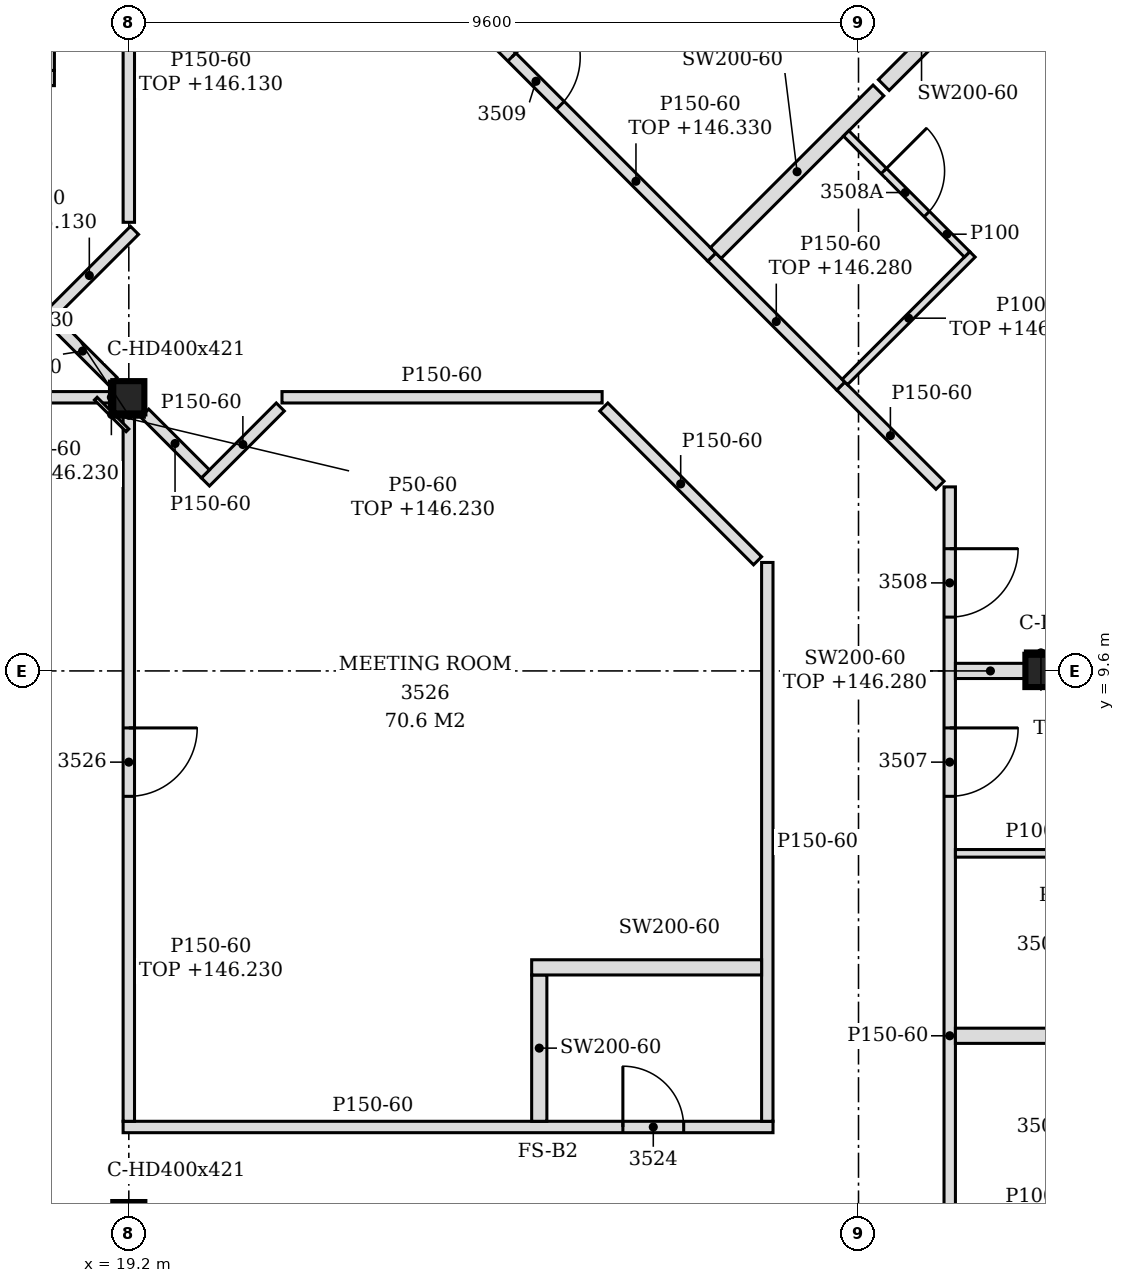
"""IFC4 building model, lengths in metres.
Left out: names, types, materials, properties, quantities, classifications, styles, units other than length and angle.
Written with IfcOpenShell. Run it as: python <this file> out.ifc"""

import sys

from ifc_helpers import new_model, si_unit, direction, frame, frame_2d, origin, origin_2d, place, context, subcontext, project, spatial, polyline, rectangle, i_section, outline, extrude, element, fill, save


model = new_model("IFC4")
c1 = context("Model", 3, precision=1e-05, world=origin(), true_north=direction((0.0, 1.0)))
c2 = subcontext(c1, "Body", "Model", "MODEL_VIEW")
j1 = project(units=[si_unit("LENGTHUNIT", "METRE"), si_unit("PLANEANGLEUNIT", "RADIAN")], contexts=[c1])
p1 = place(None, origin())
s1 = spatial("IfcSite", under=j1, at=p1, CompositionType="ELEMENT")
p2 = place(p1, origin())
s2 = spatial("IfcBuilding", under=s1, at=p2, CompositionType="ELEMENT")
p3 = place(p2, frame((0.0, 0.0, 143.4)))
s3 = spatial("IfcBuildingStorey", under=s2, at=p3, CompositionType="ELEMENT", Elevation=143.4)
for number, where, z_axis, x_axis in (
    (1, (19.2, 2.4, -0.15), (0.0, 0.0, 1.0), (1.0, 0.0, 0.0)),
    (2, (19.2, 13.2, -0.15), (0.0, 0.0, 1.0), (1.0, 0.0, 0.0)),
    (3, (31.2, 9.6, -0.15), (0.0, 0.0, 1.0), (1.0, 0.0, 0.0)),
):
    element("IfcColumn", number, at=place(p3, frame(where, z_axis=z_axis, x_axis=x_axis)), inside=s3, PredefinedType="COLUMN", context=c2, shape_type="SweptSolid", body=[
        extrude(i_section(OverallWidth=0.409, OverallDepth=0.425, WebThickness=0.033, FlangeThickness=0.052, FilletRadius=0.015, at=origin_2d()), origin(), (0.0, 0.0, 1.0), 3.6),
    ])
p4 = place(p3, frame((30.0, -0.813, 0.0), z_axis=(0.0, 0.0, 1.0), x_axis=(0.0, 1.0, 0.0)))
e4 = element("IfcWall", 4, at=p4, inside=s3, PredefinedType="PARTITIONING", context=c2, shape_type="SweptSolid", body=[
    extrude(outline(polyline([(0.0, 0.0), (12.834, 0.0), (12.834, 3.45), (10.518, 3.45), (10.516, 2.88), (10.308, 2.88), (10.306, 3.45), (5.718, 3.45), (5.716, 2.88), (5.508, 2.88), (5.506, 3.45), (0.918, 3.45), (0.916, 2.88), (0.708, 2.88), (0.706, 3.45), (0.0, 3.45), (0.0, 0.0)])), frame((0.0, 0.075, 0.0), z_axis=(0.0, -1.0, 0.0), x_axis=(1.0, 0.0, 0.0)), (0.0, 0.0, 1.0), 0.15),
])
p5 = place(p4, frame((1.563, 0.0, 0.0)))
e5 = element("IfcOpeningElement", 5, at=p5, cuts=e4, PredefinedType="OPENING", context=c2, shape_type="SweptSolid", body=[
    extrude(rectangle(XDim=0.9, YDim=2.1, at=frame_2d((0.45, 1.05))), frame((0.0, 0.085, 0.0), z_axis=(0.0, -1.0, 0.0), x_axis=(1.0, 0.0, 0.0)), (0.0, 0.0, 1.0), 0.17),
])
p6 = place(p4, frame((8.763, 0.0, 0.0)))
e6 = element("IfcOpeningElement", 6, at=p6, cuts=e4, PredefinedType="OPENING", context=c2, shape_type="SweptSolid", body=[
    extrude(rectangle(XDim=0.9, YDim=2.1, at=frame_2d((0.45, 1.05))), frame((0.0, 0.085, 0.0), z_axis=(0.0, -1.0, 0.0), x_axis=(1.0, 0.0, 0.0)), (0.0, 0.0, 1.0), 0.17),
])
p7 = place(p4, frame((11.121, 0.0, 0.0)))
e7 = element("IfcOpeningElement", 7, at=p7, cuts=e4, PredefinedType="OPENING", context=c2, shape_type="SweptSolid", body=[
    extrude(rectangle(XDim=0.9, YDim=2.1, at=frame_2d((0.45, 1.05))), frame((0.0, 0.085, 0.0), z_axis=(0.0, -1.0, 0.0), x_axis=(1.0, 0.0, 0.0)), (0.0, 0.0, 1.0), 0.17),
])
p8 = place(p3, frame((19.125, 3.6, 0.0), z_axis=(0.0, 0.0, 1.0), x_axis=(1.0, 0.0, 0.0)))
e8 = element("IfcWall", 8, at=p8, inside=s3, PredefinedType="PARTITIONING", context=c2, shape_type="SweptSolid", body=[
    extrude(outline(polyline([(0.0, 0.0), (8.55, 0.0), (8.55, 3.45), (0.225, 3.45), (0.223, 2.83), (0.0, 2.83), (0.0, 0.0)])), frame((0.0, 0.075, 0.0), z_axis=(0.0, -1.0, 0.0), x_axis=(1.0, 0.0, 0.0)), (0.0, 0.0, 1.0), 0.15),
])
p9 = place(p8, frame((6.575, 0.0, 0.0)))
e9 = element("IfcOpeningElement", 9, at=p9, cuts=e8, PredefinedType="OPENING", context=c2, shape_type="SweptSolid", body=[
    extrude(rectangle(XDim=0.8, YDim=2.1, at=frame_2d((0.4, 1.05))), frame((0.0, 0.085, 0.0), z_axis=(0.0, -1.0, 0.0), x_axis=(1.0, 0.0, 0.0)), (0.0, 0.0, 1.0), 0.17),
])
p10 = place(p3, frame((19.2, 3.675, 0.0), z_axis=(0.0, 0.0, 1.0), x_axis=(0.0, 1.0, 0.0)))
e10 = element("IfcWall", 10, at=p10, inside=s3, PredefinedType="PARTITIONING", context=c2, shape_type="SweptSolid", body=[
    extrude(rectangle(XDim=9.312, YDim=0.15, at=frame_2d((4.656, 0.0))), origin(), (0.0, 0.0, 1.0), 2.83),
])
p11 = place(p10, frame((4.275, 0.0, 0.0)))
e11 = element("IfcOpeningElement", 11, at=p11, cuts=e10, PredefinedType="OPENING", context=c2, shape_type="SweptSolid", body=[
    extrude(rectangle(XDim=0.9, YDim=2.1, at=frame_2d((0.45, 1.05))), frame((0.0, 0.085, 0.0), z_axis=(0.0, -1.0, 0.0), x_axis=(1.0, 0.0, 0.0)), (0.0, 0.0, 1.0), 0.17),
])
p12 = place(p3, frame((24.6, 3.675, 0.0), z_axis=(0.0, 0.0, 1.0), x_axis=(0.0, 1.0, 0.0)))
e12 = element("IfcWall", 12, at=p12, inside=s3, PredefinedType="PARTITIONING", context=c2, shape_type="SweptSolid", body=[
    extrude(outline(polyline([(0.0, 0.0), (1.925, 0.0), (1.925, 3.45), (1.23, 3.45), (1.228, 2.88), (1.02, 2.88), (1.018, 3.45), (0.0, 3.45), (0.0, 0.0)])), frame((0.0, 0.1, 0.0), z_axis=(0.0, -1.0, 0.0), x_axis=(1.0, 0.0, 0.0)), (0.0, 0.0, 1.0), 0.2),
])
p13 = place(p3, frame((27.6, 3.675, 0.0), z_axis=(0.0, 0.0, 1.0), x_axis=(0.0, 1.0, 0.0)))
e13 = element("IfcWall", 13, at=p13, inside=s3, PredefinedType="PARTITIONING", context=c2, shape_type="SweptSolid", body=[
    extrude(outline(polyline([(0.0, 0.0), (7.352, 0.0), (7.352, 3.45), (6.03, 3.45), (6.028, 2.88), (5.82, 2.88), (5.818, 3.45), (1.23, 3.45), (1.228, 2.88), (1.02, 2.88), (1.018, 3.45), (0.0, 3.45), (0.0, 0.0)])), frame((0.0, 0.075, 0.0), z_axis=(0.0, -1.0, 0.0), x_axis=(1.0, 0.0, 0.0)), (0.0, 0.0, 1.0), 0.15),
])
p14 = place(p3, frame((30.075, 4.8, 0.0), z_axis=(0.0, 0.0, 1.0), x_axis=(1.0, 0.0, 0.0)))
e14 = element("IfcWall", 14, at=p14, inside=s3, PredefinedType="PARTITIONING", context=c2, shape_type="SweptSolid", body=[
    extrude(rectangle(XDim=4.675, YDim=0.2, at=frame_2d((2.337, 0.0))), origin(), (0.0, 0.0, 1.0), 2.88),
])
p15 = place(p3, frame((24.5, 5.7, 0.0), z_axis=(0.0, 0.0, 1.0), x_axis=(1.0, 0.0, 0.0)))
e15 = element("IfcWall", 15, at=p15, inside=s3, PredefinedType="PARTITIONING", context=c2, shape_type="SweptSolid", body=[
    extrude(rectangle(XDim=3.025, YDim=0.2, at=frame_2d((1.512, 0.0))), origin(), (0.0, 0.0, 1.0), 3.45),
])
p16 = place(p3, frame((30.075, 7.2, 0.0), z_axis=(0.0, 0.0, 1.0), x_axis=(1.0, 0.0, 0.0)))
e16 = element("IfcWall", 16, at=p16, inside=s3, PredefinedType="PARTITIONING", context=c2, shape_type="SweptSolid", body=[
    extrude(outline(polyline([(0.0, 0.0), (1.975, 0.0), (1.975, 3.45), (1.275, 3.45), (1.273, 2.93), (0.975, 2.93), (0.973, 3.45), (0.0, 3.45), (0.0, 0.0)])), frame((0.0, 0.05, 0.0), z_axis=(0.0, -1.0, 0.0), x_axis=(1.0, 0.0, 0.0)), (0.0, 0.0, 1.0), 0.1),
])
p17 = place(p3, frame((30.075, 9.6, 0.0), z_axis=(0.0, 0.0, 1.0), x_axis=(1.0, 0.0, 0.0)))
e17 = element("IfcWall", 17, at=p17, inside=s3, PredefinedType="PARTITIONING", context=c2, shape_type="SweptSolid", body=[
    extrude(rectangle(XDim=0.921, YDim=0.2, at=frame_2d((0.46, 0.0))), origin(), (0.0, 0.0, 1.0), 2.88),
])
p18 = place(p3, frame((27.472, 11.049, 0.0), z_axis=(0.0, 0.0, 1.0), x_axis=(-0.707106781187, 0.707106781187, 0.0)))
e18 = element("IfcWall", 18, at=p18, inside=s3, PredefinedType="PARTITIONING", context=c2, shape_type="SweptSolid", body=[
    extrude(rectangle(XDim=2.861, YDim=0.15, at=frame_2d((1.43, 0.0))), origin(), (0.0, 0.0, 1.0), 3.45),
])
p19 = place(p3, frame((29.872, 12.043, 0.0), z_axis=(0.0, 0.0, 1.0), x_axis=(-0.707172918471, 0.707040637716, 0.0)))
e19 = element("IfcWall", 19, at=p19, inside=s3, PredefinedType="PARTITIONING", context=c2, shape_type="SweptSolid", body=[
    extrude(rectangle(XDim=1.846, YDim=0.15, at=frame_2d((0.923, 0.0))), origin(), (0.0, 0.0, 1.0), 3.45),
])
p20 = place(p3, frame((20.208, 12.086, 0.0), z_axis=(0.0, 0.0, 1.0), x_axis=(0.706756381459, 0.707457007363, 0.0)))
e20 = element("IfcWall", 20, at=p20, inside=s3, PredefinedType="PARTITIONING", context=c2, shape_type="SweptSolid", body=[
    extrude(rectangle(XDim=1.394, YDim=0.15, at=frame_2d((0.697, 0.0))), origin(), (0.0, 0.0, 1.0), 3.45),
])
p21 = place(p3, frame((20.208, 12.192, 0.0), z_axis=(0.0, 0.0, 1.0), x_axis=(-0.70721474466, 0.706998801226, 0.0)))
e21 = element("IfcWall", 21, at=p21, inside=s3, PredefinedType="PARTITIONING", context=c2, shape_type="SweptSolid", body=[
    extrude(rectangle(XDim=1.131, YDim=0.15, at=frame_2d((0.565, 0.0))), origin(), (0.0, 0.0, 1.0), 3.45),
])
p22 = place(p3, frame((7.405, 13.2, 0.0), z_axis=(0.0, 0.0, 1.0), x_axis=(1.0, 0.0, 0.0)))
e22 = element("IfcWall", 22, at=p22, inside=s3, PredefinedType="PARTITIONING", context=c2, shape_type="SweptSolid", body=[
    extrude(rectangle(XDim=11.591, YDim=0.15, at=frame_2d((5.795, 0.0))), origin(), (0.0, 0.0, 1.0), 2.83),
])
p23 = place(p22, frame((5.345, 0.0, 0.0)))
e23 = element("IfcOpeningElement", 23, at=p23, cuts=e22, PredefinedType="OPENING", context=c2, shape_type="SweptSolid", body=[
    extrude(rectangle(XDim=0.9, YDim=2.1, at=frame_2d((0.45, 1.05))), frame((0.0, 0.085, 0.0), z_axis=(0.0, -1.0, 0.0), x_axis=(1.0, 0.0, 0.0)), (0.0, 0.0, 1.0), 0.17),
])
p24 = place(p3, frame((21.215, 13.2, 0.0), z_axis=(0.0, 0.0, 1.0), x_axis=(1.0, 0.0, 0.0)))
e24 = element("IfcWall", 24, at=p24, inside=s3, PredefinedType="PARTITIONING", context=c2, shape_type="SweptSolid", body=[
    extrude(rectangle(XDim=4.212, YDim=0.15, at=frame_2d((2.106, 0.0))), origin(), (0.0, 0.0, 1.0), 3.45),
])
p25 = place(p3, frame((28.567, 13.348, 0.0), z_axis=(0.0, 0.0, 1.0), x_axis=(-0.707310148094, 0.706903355773, 0.0)))
e25 = element("IfcWall", 25, at=p25, inside=s3, PredefinedType="PARTITIONING", context=c2, shape_type="SweptSolid", body=[
    extrude(rectangle(XDim=2.401, YDim=0.15, at=frame_2d((1.2, 0.0))), origin(), (0.0, 0.0, 1.0), 2.88),
])
p26 = place(p3, frame((18.991, 13.408, 0.0), z_axis=(0.0, 0.0, 1.0), x_axis=(-0.706998801226, 0.70721474466, 0.0)))
e26 = element("IfcWall", 26, at=p26, inside=s3, PredefinedType="PARTITIONING", context=c2, shape_type="SweptSolid", body=[
    extrude(rectangle(XDim=1.131, YDim=0.15, at=frame_2d((0.565, 0.0))), origin(), (0.0, 0.0, 1.0), 3.45),
])
p27 = place(p3, frame((28.62, 13.401, 0.0), z_axis=(0.0, 0.0, 1.0), x_axis=(0.707055379538, 0.707158179099, 0.0)))
e27 = element("IfcWall", 27, at=p27, inside=s3, PredefinedType="PARTITIONING", context=c2, shape_type="SweptSolid", body=[
    extrude(rectangle(XDim=2.375, YDim=0.1, at=frame_2d((1.188, 0.0))), origin(), (0.0, 0.0, 1.0), 2.88),
])
p28 = place(p3, frame((18.086, 14.208, 0.0), z_axis=(0.0, 0.0, 1.0), x_axis=(0.70739723372, 0.706816209298, 0.0)))
e28 = element("IfcWall", 28, at=p28, inside=s3, PredefinedType="PARTITIONING", context=c2, shape_type="SweptSolid", body=[
    extrude(rectangle(XDim=1.681, YDim=0.15, at=frame_2d((0.84, 0.0))), origin(), (0.0, 0.0, 1.0), 2.73),
])
p29 = place(p3, frame((26.869, 15.045, 0.0), z_axis=(0.0, 0.0, 1.0), x_axis=(-0.707013447311, 0.707200102744, 0.0)))
e29 = element("IfcWall", 29, at=p29, inside=s3, PredefinedType="PARTITIONING", context=c2, shape_type="SweptSolid", body=[
    extrude(rectangle(XDim=6.54, YDim=0.15, at=frame_2d((3.27, 0.0))), origin(), (0.0, 0.0, 1.0), 2.93),
])
p30 = place(p29, frame((2.82, 0.0, 0.0)))
e30 = element("IfcOpeningElement", 30, at=p30, cuts=e29, PredefinedType="OPENING", context=c2, shape_type="SweptSolid", body=[
    extrude(rectangle(XDim=0.9, YDim=2.1, at=frame_2d((0.45, 1.05))), frame((0.0, 0.085, 0.0), z_axis=(0.0, -1.0, 0.0), x_axis=(1.0, 0.0, 0.0)), (0.0, 0.0, 1.0), 0.17),
])
p31 = place(p3, frame((26.922, 15.098, 0.0), z_axis=(0.0, 0.0, 1.0), x_axis=(0.707268147401, 0.706945378138, 0.0)))
e31 = element("IfcWall", 31, at=p31, inside=s3, PredefinedType="PARTITIONING", context=c2, shape_type="SweptSolid", body=[
    extrude(rectangle(XDim=3.026, YDim=0.2, at=frame_2d((1.513, 0.0))), origin(), (0.0, 0.0, 1.0), 3.45),
])
p32 = place(p3, frame((30.229, 15.08, 0.0), z_axis=(0.0, 0.0, 1.0), x_axis=(-0.707052524, 0.70716103421, 0.0)))
e32 = element("IfcWall", 32, at=p32, inside=s3, PredefinedType="PARTITIONING", context=c2, shape_type="SweptSolid", body=[
    extrude(rectangle(XDim=2.25, YDim=0.1, at=frame_2d((1.125, 0.0))), origin(), (0.0, 0.0, 1.0), 3.45),
])
p33 = place(p32, frame((0.75, 0.0, 0.0)))
e33 = element("IfcOpeningElement", 33, at=p33, cuts=e32, PredefinedType="OPENING", context=c2, shape_type="SweptSolid", body=[
    extrude(rectangle(XDim=0.8, YDim=2.1, at=frame_2d((0.4, 1.05))), frame((0.0, 0.06, 0.0), z_axis=(0.0, -1.0, 0.0), x_axis=(1.0, 0.0, 0.0)), (0.0, 0.0, 1.0), 0.12),
])
p34 = place(p3, frame((19.2, 15.502, 0.0), z_axis=(0.0, 0.0, 1.0), x_axis=(0.0, 1.0, 0.0)))
e34 = element("IfcWall", 34, at=p34, inside=s3, PredefinedType="PARTITIONING", context=c2, shape_type="SweptSolid", body=[
    extrude(rectangle(XDim=3.925, YDim=0.15, at=frame_2d((1.962, 0.0))), origin(), (0.0, 0.0, 1.0), 2.73),
])
p35 = place(p3, frame((29.133, 17.308, 0.0), z_axis=(0.0, 0.0, 1.0), x_axis=(0.70693298083, 0.707280538835, 0.0)))
e35 = element("IfcWall", 35, at=p35, inside=s3, PredefinedType="PARTITIONING", context=c2, shape_type="SweptSolid", body=[
    extrude(rectangle(XDim=1.405, YDim=0.2, at=frame_2d((0.702, 0.0))), origin(), (0.0, 0.0, 1.0), 3.45),
])
p36 = place(p3, frame((15.021, 17.4, 0.0), z_axis=(0.0, 0.0, 1.0), x_axis=(1.0, 0.0, 0.0)))
e36 = element("IfcWall", 36, at=p36, inside=s3, PredefinedType="PARTITIONING", context=c2, shape_type="SweptSolid", body=[
    extrude(rectangle(XDim=3.2, YDim=0.2, at=frame_2d((1.6, 0.0))), origin(), (0.0, 0.0, 1.0), 3.45),
])
p37 = place(p3, frame((18.121, 17.5, 0.0), z_axis=(0.0, 0.0, 1.0), x_axis=(0.0, 1.0, 0.0)))
e37 = element("IfcWall", 37, at=p37, inside=s3, PredefinedType="PARTITIONING", context=c2, shape_type="SweptSolid", body=[
    extrude(outline(polyline([(0.0, 0.0), (3.016, 0.0), (3.016, 3.45), (1.805, 3.45), (1.803, 2.88), (1.595, 2.88), (1.593, 3.45), (0.0, 3.45), (0.0, 0.0)])), frame((0.0, 0.1, 0.0), z_axis=(0.0, -1.0, 0.0), x_axis=(1.0, 0.0, 0.0)), (0.0, 0.0, 1.0), 0.2),
])
p38 = place(p3, frame((18.97, 12.988, 0.0), z_axis=(0.0, 0.0, 1.0), x_axis=(0.0, 1.0, 0.0)))
e38 = element("IfcWall", 38, at=p38, inside=s3, PredefinedType="PARTITIONING", context=c2, shape_type="SweptSolid", body=[
    extrude(rectangle(XDim=0.425, YDim=0.05, at=frame_2d((0.212, 0.0))), origin(), (0.0, 0.0, 1.0), 2.83),
])
p39 = place(p3, frame((30.996, 9.837, 0.0), z_axis=(0.0, 0.0, 1.0), x_axis=(1.0, 0.0, 0.0)))
e39 = element("IfcWall", 39, at=p39, inside=s3, PredefinedType="PARTITIONING", context=c2, shape_type="SweptSolid", body=[
    extrude(rectangle(XDim=0.409, YDim=0.05, at=frame_2d((0.205, 0.0))), origin(), (0.0, 0.0, 1.0), 2.93),
])
p40 = place(p3, frame((19.182, 12.765, 0.0), z_axis=(0.0, 0.0, 1.0), x_axis=(-0.707106781187, 0.707106781187, 0.0)))
e40 = element("IfcWall", 40, at=p40, inside=s3, PredefinedType="PARTITIONING", context=c2, shape_type="SweptSolid", body=[
    extrude(rectangle(XDim=0.59, YDim=0.05, at=frame_2d((0.295, 0.0))), origin(), (0.0, 0.0, 1.0), 2.83),
])
p41 = place(p3, frame((18.996, 12.962, 0.0), z_axis=(0.0, 0.0, 1.0), x_axis=(1.0, 0.0, 0.0)))
e41 = element("IfcWall", 41, at=p41, inside=s3, PredefinedType="PARTITIONING", context=c2, shape_type="SweptSolid", body=[
    extrude(rectangle(XDim=0.409, YDim=0.05, at=frame_2d((0.205, 0.0))), origin(), (0.0, 0.0, 1.0), 2.83),
])
p42 = place(p6, frame((0.9, 0.0, 0.0), z_axis=(0.0, 0.0, 1.0), x_axis=(-1.0, 0.0, 0.0)))
e42 = element("IfcDoor", 42, at=p42, inside=s3, OperationType="SINGLE_SWING_LEFT", PredefinedType="DOOR", context=c2, shape_type="SweptSolid", body=[
    extrude(rectangle(XDim=0.9, YDim=2.1, at=frame_2d((0.45, 1.05))), frame((0.0, 0.025, 0.0), z_axis=(0.0, -1.0, 0.0), x_axis=(1.0, 0.0, 0.0)), (0.0, 0.0, 1.0), 0.05),
])
fill(e6, e42)
p43 = place(p7, frame((0.9, 0.0, 0.0), z_axis=(0.0, 0.0, 1.0), x_axis=(-1.0, 0.0, 0.0)))
e43 = element("IfcDoor", 43, at=p43, inside=s3, OperationType="SINGLE_SWING_LEFT", PredefinedType="DOOR", context=c2, shape_type="SweptSolid", body=[
    extrude(rectangle(XDim=0.9, YDim=2.1, at=frame_2d((0.45, 1.05))), frame((0.0, 0.025, 0.0), z_axis=(0.0, -1.0, 0.0), x_axis=(1.0, 0.0, 0.0)), (0.0, 0.0, 1.0), 0.05),
])
fill(e7, e43)
p44 = place(p33, frame((0.8, 0.0, 0.0), z_axis=(0.0, 0.0, 1.0), x_axis=(-1.0, 0.0, 0.0)))
e44 = element("IfcDoor", 44, at=p44, inside=s3, OperationType="SINGLE_SWING_LEFT", PredefinedType="DOOR", context=c2, shape_type="SweptSolid", body=[
    extrude(rectangle(XDim=0.8, YDim=2.1, at=frame_2d((0.4, 1.05))), frame((0.0, 0.025, 0.0), z_axis=(0.0, -1.0, 0.0), x_axis=(1.0, 0.0, 0.0)), (0.0, 0.0, 1.0), 0.05),
])
fill(e33, e44)
p45 = place(p30, frame((0.9, 0.0, 0.0), z_axis=(0.0, 0.0, 1.0), x_axis=(-1.0, 0.0, 0.0)))
e45 = element("IfcDoor", 45, at=p45, inside=s3, OperationType="SINGLE_SWING_LEFT", PredefinedType="DOOR", context=c2, shape_type="SweptSolid", body=[
    extrude(rectangle(XDim=0.9, YDim=2.1, at=frame_2d((0.45, 1.05))), frame((0.0, 0.025, 0.0), z_axis=(0.0, -1.0, 0.0), x_axis=(1.0, 0.0, 0.0)), (0.0, 0.0, 1.0), 0.05),
])
fill(e30, e45)
p46 = place(p9, origin())
e46 = element("IfcDoor", 46, at=p46, inside=s3, OperationType="SINGLE_SWING_LEFT", PredefinedType="DOOR", context=c2, shape_type="SweptSolid", body=[
    extrude(rectangle(XDim=0.8, YDim=2.1, at=frame_2d((0.4, 1.05))), frame((0.0, 0.025, 0.0), z_axis=(0.0, -1.0, 0.0), x_axis=(1.0, 0.0, 0.0)), (0.0, 0.0, 1.0), 0.05),
])
fill(e9, e46)
p47 = place(p11, frame((0.9, 0.0, 0.0), z_axis=(0.0, 0.0, 1.0), x_axis=(-1.0, 0.0, 0.0)))
e47 = element("IfcDoor", 47, at=p47, inside=s3, OperationType="SINGLE_SWING_LEFT", PredefinedType="DOOR", context=c2, shape_type="SweptSolid", body=[
    extrude(rectangle(XDim=0.9, YDim=2.1, at=frame_2d((0.45, 1.05))), frame((0.0, 0.025, 0.0), z_axis=(0.0, -1.0, 0.0), x_axis=(1.0, 0.0, 0.0)), (0.0, 0.0, 1.0), 0.05),
])
fill(e11, e47)
save(model, sys.argv[1])
